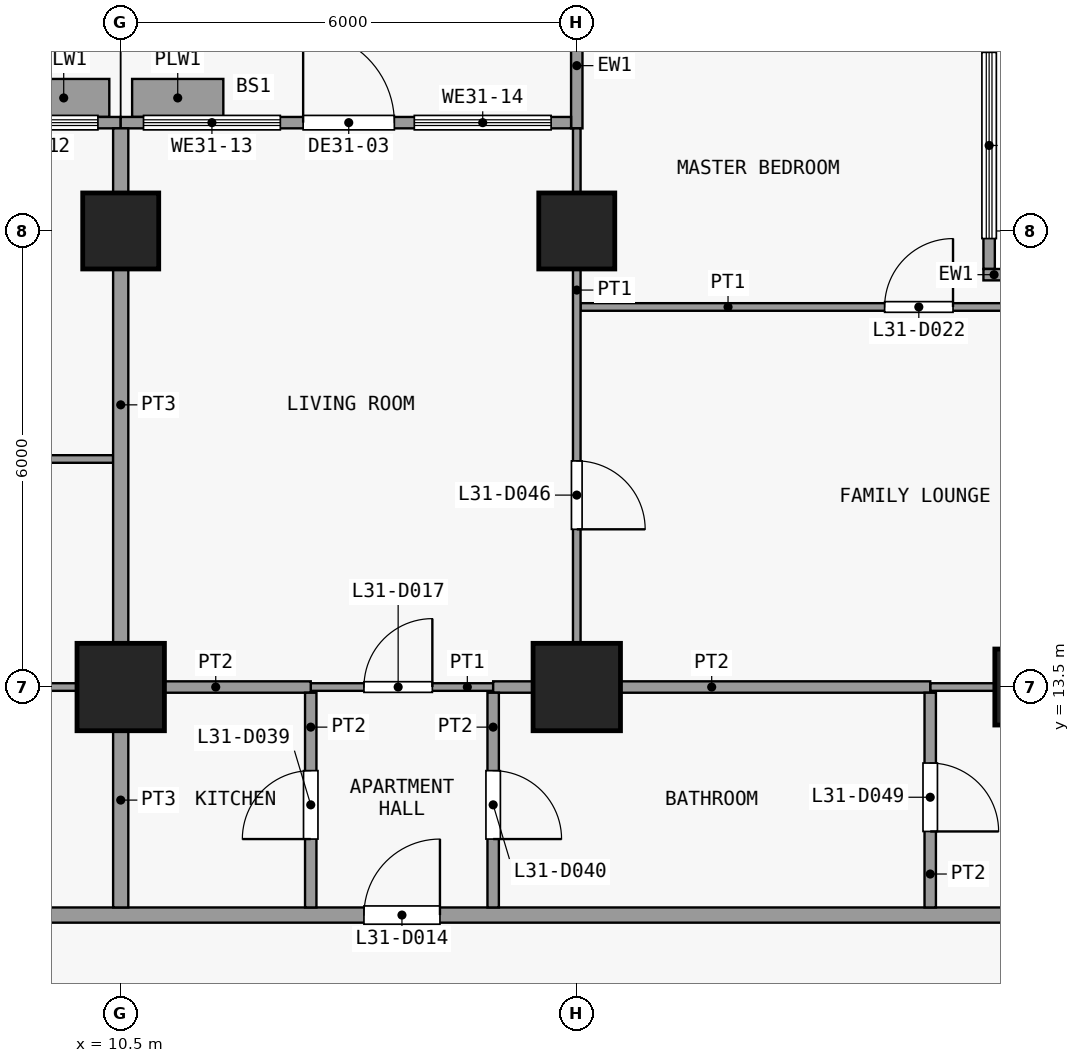
"""IFC4 building model, lengths in metres.
Left out: names, types, materials, properties, quantities, classifications, styles, units other than length and angle.
Written with IfcOpenShell. Run it as: python <this file> out.ifc"""

import sys

from ifc_helpers import new_model, si_unit, direction, frame, frame_2d, origin, origin_2d, place, context, subcontext, project, spatial, rectangle, extrude, element, fill, save


model = new_model("IFC4")
c1 = context("Model", 3, precision=1e-05, world=origin(), true_north=direction((0.0, 1.0)))
c2 = subcontext(c1, "Body", "Model", "MODEL_VIEW")
j1 = project(units=[si_unit("LENGTHUNIT", "METRE"), si_unit("PLANEANGLEUNIT", "RADIAN")], contexts=[c1])
p1 = place(None, origin())
s1 = spatial("IfcSite", under=j1, at=p1, CompositionType="ELEMENT")
p2 = place(p1, origin())
s2 = spatial("IfcBuilding", under=s1, at=p2, CompositionType="ELEMENT")
p3 = place(p2, frame((0.0, 0.0, 124.3)))
s3 = spatial("IfcBuildingStorey", under=s2, at=p3, CompositionType="ELEMENT", Elevation=124.3)
p4 = place(p3, frame((10.5, 13.5, 0.0), z_axis=(0.0, 0.0, 1.0), x_axis=(1.0, 0.0, 0.0)))
e1 = element("IfcColumn", 1, at=p4, inside=s3, PredefinedType="COLUMN", context=c2, shape_type="SweptSolid", body=[
    extrude(rectangle(XDim=1.15, YDim=1.15, at=origin_2d()), origin(), (0.0, 0.0, 1.0), 3.6),
])
p5 = place(p3, frame((10.5, 19.5, 0.0), z_axis=(0.0, 0.0, 1.0), x_axis=(1.0, 0.0, 0.0)))
e2 = element("IfcColumn", 2, at=p5, inside=s3, PredefinedType="COLUMN", context=c2, shape_type="SweptSolid", body=[
    extrude(rectangle(XDim=1.0, YDim=1.0, at=origin_2d()), origin(), (0.0, 0.0, 1.0), 3.6),
])
p6 = place(p3, frame((16.5, 13.5, 0.0), z_axis=(0.0, 0.0, 1.0), x_axis=(1.0, 0.0, 0.0)))
e3 = element("IfcColumn", 3, at=p6, inside=s3, PredefinedType="COLUMN", context=c2, shape_type="SweptSolid", body=[
    extrude(rectangle(XDim=1.15, YDim=1.15, at=origin_2d()), origin(), (0.0, 0.0, 1.0), 3.6),
])
for number, where, z_axis, x_axis in (
    (4, (16.5, 19.5, 0.0), (0.0, 0.0, 1.0), (1.0, 0.0, 0.0)),
    (5, (22.5, 13.5, 0.0), (0.0, 0.0, 1.0), (1.0, 0.0, 0.0)),
):
    element("IfcColumn", number, at=place(p3, frame(where, z_axis=z_axis, x_axis=x_axis)), inside=s3, PredefinedType="COLUMN", context=c2, shape_type="SweptSolid", body=[
        extrude(rectangle(XDim=1.0, YDim=1.0, at=origin_2d()), origin(), (0.0, 0.0, 1.0), 3.6),
    ])
p7 = place(p3, frame((21.925, 22.25, 0.0), z_axis=(0.0, 0.0, 1.0), x_axis=(0.0, -1.0, 0.0)))
e6 = element("IfcWall", 6, at=p7, inside=s3, PredefinedType="SOLIDWALL", context=c2, shape_type="SweptSolid", body=[
    extrude(rectangle(XDim=3.25, YDim=0.15, at=frame_2d((1.625, 0.0))), origin(), (0.0, 0.0, 1.0), 3.3),
])
p8 = place(p7, frame((0.4, 0.0, 0.9)))
e7 = element("IfcOpeningElement", 7, at=p8, cuts=e6, PredefinedType="OPENING", context=c2, shape_type="SweptSolid", body=[
    extrude(rectangle(XDim=2.45, YDim=2.4, at=frame_2d((1.225, 1.2))), frame((0.0, 0.085, 0.0), z_axis=(0.0, -1.0, 0.0), x_axis=(1.0, 0.0, 0.0)), (0.0, 0.0, 1.0), 0.17),
])
p9 = place(p3, frame((21.85, 18.925, 0.0), z_axis=(0.0, 0.0, 1.0), x_axis=(1.0, 0.0, 0.0)))
e8 = element("IfcWall", 8, at=p9, inside=s3, PredefinedType="SOLIDWALL", context=c2, shape_type="SweptSolid", body=[
    extrude(rectangle(XDim=3.65, YDim=0.15, at=frame_2d((1.825, 0.0))), origin(), (0.0, 0.0, 1.0), 3.3),
])
p10 = place(p9, frame((0.4, 0.0, 0.9)))
e9 = element("IfcOpeningElement", 9, at=p10, cuts=e8, PredefinedType="OPENING", context=c2, shape_type="SweptSolid", body=[
    extrude(rectangle(XDim=2.85, YDim=2.4, at=frame_2d((1.425, 1.2))), frame((0.0, 0.085, 0.0), z_axis=(0.0, -1.0, 0.0), x_axis=(1.0, 0.0, 0.0)), (0.0, 0.0, 1.0), 0.17),
])
p11 = place(p3, frame((4.5, 20.925, 0.0), z_axis=(0.0, 0.0, 1.0), x_axis=(1.0, 0.0, 0.0)))
e10 = element("IfcWall", 10, at=p11, inside=s3, PredefinedType="SOLIDWALL", context=c2, shape_type="SweptSolid", body=[
    extrude(rectangle(XDim=6.0, YDim=0.15, at=frame_2d((3.0, 0.0))), origin(), (0.0, 0.0, 1.0), 3.3),
])
p12 = place(p11, frame((2.4, 0.0, 0.0)))
e11 = element("IfcOpeningElement", 11, at=p12, cuts=e10, PredefinedType="OPENING", context=c2, shape_type="SweptSolid", body=[
    extrude(rectangle(XDim=1.2, YDim=2.4, at=frame_2d((0.6, 1.2))), frame((0.0, 0.085, 0.0), z_axis=(0.0, -1.0, 0.0), x_axis=(1.0, 0.0, 0.0)), (0.0, 0.0, 1.0), 0.17),
])
p13 = place(p11, frame((0.3, 0.0, 0.9)))
e12 = element("IfcOpeningElement", 12, at=p13, cuts=e10, PredefinedType="OPENING", context=c2, shape_type="SweptSolid", body=[
    extrude(rectangle(XDim=1.8, YDim=2.1, at=frame_2d((0.9, 1.05))), frame((0.0, 0.085, 0.0), z_axis=(0.0, -1.0, 0.0), x_axis=(1.0, 0.0, 0.0)), (0.0, 0.0, 1.0), 0.17),
])
p14 = place(p11, frame((3.9, 0.0, 0.9)))
e13 = element("IfcOpeningElement", 13, at=p14, cuts=e10, PredefinedType="OPENING", context=c2, shape_type="SweptSolid", body=[
    extrude(rectangle(XDim=1.8, YDim=2.1, at=frame_2d((0.9, 1.05))), frame((0.0, 0.085, 0.0), z_axis=(0.0, -1.0, 0.0), x_axis=(1.0, 0.0, 0.0)), (0.0, 0.0, 1.0), 0.17),
])
p15 = place(p3, frame((9.15, 21.25, 0.0), z_axis=(0.0, 0.0, 1.0), x_axis=(1.0, 0.0, 0.0)))
e14 = element("IfcWall", 14, at=p15, inside=s3, PredefinedType="USERDEFINED", context=c2, shape_type="SweptSolid", body=[
    extrude(rectangle(XDim=1.2, YDim=0.5, at=frame_2d((0.6, 0.0))), origin(), (0.0, 0.0, 1.0), 0.9),
])
p16 = place(p3, frame((16.5, 20.85, 0.0), z_axis=(0.0, 0.0, 1.0), x_axis=(0.0, 1.0, 0.0)))
e15 = element("IfcWall", 15, at=p16, inside=s3, PredefinedType="SOLIDWALL", context=c2, shape_type="SweptSolid", body=[
    extrude(rectangle(XDim=1.65, YDim=0.15, at=frame_2d((0.825, 0.0))), origin(), (0.0, 0.0, 1.0), 3.3),
])
p17 = place(p3, frame((10.5, 20.925, 0.0), z_axis=(0.0, 0.0, 1.0), x_axis=(1.0, 0.0, 0.0)))
e16 = element("IfcWall", 16, at=p17, inside=s3, PredefinedType="SOLIDWALL", context=c2, shape_type="SweptSolid", body=[
    extrude(rectangle(XDim=5.925, YDim=0.15, at=frame_2d((2.962, 0.0))), origin(), (0.0, 0.0, 1.0), 3.3),
])
p18 = place(p17, frame((2.4, 0.0, 0.0)))
e17 = element("IfcOpeningElement", 17, at=p18, cuts=e16, PredefinedType="OPENING", context=c2, shape_type="SweptSolid", body=[
    extrude(rectangle(XDim=1.2, YDim=2.4, at=frame_2d((0.6, 1.2))), frame((0.0, 0.085, 0.0), z_axis=(0.0, -1.0, 0.0), x_axis=(1.0, 0.0, 0.0)), (0.0, 0.0, 1.0), 0.17),
])
p19 = place(p17, frame((0.3, 0.0, 0.9)))
e18 = element("IfcOpeningElement", 18, at=p19, cuts=e16, PredefinedType="OPENING", context=c2, shape_type="SweptSolid", body=[
    extrude(rectangle(XDim=1.8, YDim=2.1, at=frame_2d((0.9, 1.05))), frame((0.0, 0.085, 0.0), z_axis=(0.0, -1.0, 0.0), x_axis=(1.0, 0.0, 0.0)), (0.0, 0.0, 1.0), 0.17),
])
p20 = place(p17, frame((3.863, 0.0, 0.9)))
e19 = element("IfcOpeningElement", 19, at=p20, cuts=e16, PredefinedType="OPENING", context=c2, shape_type="SweptSolid", body=[
    extrude(rectangle(XDim=1.8, YDim=2.1, at=frame_2d((0.9, 1.05))), frame((0.0, 0.085, 0.0), z_axis=(0.0, -1.0, 0.0), x_axis=(1.0, 0.0, 0.0)), (0.0, 0.0, 1.0), 0.17),
])
p21 = place(p3, frame((10.65, 21.25, 0.0), z_axis=(0.0, 0.0, 1.0), x_axis=(1.0, 0.0, 0.0)))
e20 = element("IfcWall", 20, at=p21, inside=s3, PredefinedType="USERDEFINED", context=c2, shape_type="SweptSolid", body=[
    extrude(rectangle(XDim=1.2, YDim=0.5, at=frame_2d((0.6, 0.0))), origin(), (0.0, 0.0, 1.0), 0.9),
])
p22 = place(p3, frame((-25.35, 10.5, 0.0), z_axis=(0.0, 0.0, 1.0), x_axis=(1.0, 0.0, 0.0)))
e21 = element("IfcWall", 21, at=p22, inside=s3, PredefinedType="PARTITIONING", context=c2, shape_type="SweptSolid", body=[
    extrude(rectangle(XDim=49.2, YDim=0.2, at=frame_2d((24.6, 0.0))), origin(), (0.0, 0.0, 1.0), 3.3),
])
p23 = place(p22, frame((4.55, 0.0, 0.0)))
e22 = element("IfcOpeningElement", 22, at=p23, cuts=e21, PredefinedType="OPENING", context=c2, shape_type="SweptSolid", body=[
    extrude(rectangle(XDim=1.0, YDim=2.1, at=frame_2d((0.5, 1.05))), frame((0.0, 0.11, 0.0), z_axis=(0.0, -1.0, 0.0), x_axis=(1.0, 0.0, 0.0)), (0.0, 0.0, 1.0), 0.22),
])
p24 = place(p22, frame((19.05, 0.0, 0.0)))
e23 = element("IfcOpeningElement", 23, at=p24, cuts=e21, PredefinedType="OPENING", context=c2, shape_type="SweptSolid", body=[
    extrude(rectangle(XDim=1.0, YDim=2.1, at=frame_2d((0.5, 1.05))), frame((0.0, 0.11, 0.0), z_axis=(0.0, -1.0, 0.0), x_axis=(1.0, 0.0, 0.0)), (0.0, 0.0, 1.0), 0.22),
])
p25 = place(p22, frame((39.05, 0.0, 0.0)))
e24 = element("IfcOpeningElement", 24, at=p25, cuts=e21, PredefinedType="OPENING", context=c2, shape_type="SweptSolid", body=[
    extrude(rectangle(XDim=1.0, YDim=2.1, at=frame_2d((0.5, 1.05))), frame((0.0, 0.11, 0.0), z_axis=(0.0, -1.0, 0.0), x_axis=(1.0, 0.0, 0.0)), (0.0, 0.0, 1.0), 0.22),
])
p26 = place(p3, frame((2.9, 13.5, 0.0), z_axis=(0.0, 0.0, 1.0), x_axis=(1.0, 0.0, 0.0)))
e25 = element("IfcWall", 25, at=p26, inside=s3, PredefinedType="PARTITIONING", context=c2, shape_type="SweptSolid", body=[
    extrude(rectangle(XDim=7.6, YDim=0.1, at=frame_2d((3.8, 0.0))), origin(), (0.0, 0.0, 1.0), 3.3),
])
p27 = place(p3, frame((13.0, 13.5, 0.0), z_axis=(0.0, 0.0, 1.0), x_axis=(1.0, 0.0, 0.0)))
e26 = element("IfcWall", 26, at=p27, inside=s3, PredefinedType="PARTITIONING", context=c2, shape_type="SweptSolid", body=[
    extrude(rectangle(XDim=2.4, YDim=0.1, at=frame_2d((1.2, 0.0))), origin(), (0.0, 0.0, 1.0), 3.3),
])
p28 = place(p27, frame((0.7, 0.0, 0.0)))
e27 = element("IfcOpeningElement", 27, at=p28, cuts=e26, PredefinedType="OPENING", context=c2, shape_type="SweptSolid", body=[
    extrude(rectangle(XDim=0.9, YDim=2.1, at=frame_2d((0.45, 1.05))), frame((0.0, 0.06, 0.0), z_axis=(0.0, -1.0, 0.0), x_axis=(1.0, 0.0, 0.0)), (0.0, 0.0, 1.0), 0.12),
])
p29 = place(p3, frame((21.15, 13.5, 0.0), z_axis=(0.0, 0.0, 1.0), x_axis=(1.0, 0.0, 0.0)))
e28 = element("IfcWall", 28, at=p29, inside=s3, PredefinedType="PARTITIONING", context=c2, shape_type="SweptSolid", body=[
    extrude(rectangle(XDim=2.7, YDim=0.1, at=frame_2d((1.35, 0.0))), origin(), (0.0, 0.0, 1.0), 3.3),
])
p30 = place(p3, frame((10.5, 13.5, 0.0), z_axis=(0.0, 0.0, 1.0), x_axis=(1.0, 0.0, 0.0)))
e29 = element("IfcWall", 29, at=p30, inside=s3, PredefinedType="PARTITIONING", context=c2, shape_type="SweptSolid", body=[
    extrude(rectangle(XDim=2.5, YDim=0.15, at=frame_2d((1.25, 0.0))), origin(), (0.0, 0.0, 1.0), 3.3),
])
p31 = place(p3, frame((15.4, 13.5, 0.0), z_axis=(0.0, 0.0, 1.0), x_axis=(1.0, 0.0, 0.0)))
e30 = element("IfcWall", 30, at=p31, inside=s3, PredefinedType="PARTITIONING", context=c2, shape_type="SweptSolid", body=[
    extrude(rectangle(XDim=5.75, YDim=0.15, at=frame_2d((2.875, 0.0))), origin(), (0.0, 0.0, 1.0), 3.3),
])
p32 = place(p3, frame((4.55, 16.5, 0.0), z_axis=(0.0, 0.0, 1.0), x_axis=(1.0, 0.0, 0.0)))
e31 = element("IfcWall", 31, at=p32, inside=s3, PredefinedType="PARTITIONING", context=c2, shape_type="SweptSolid", body=[
    extrude(rectangle(XDim=5.85, YDim=0.1, at=frame_2d((2.925, 0.0))), origin(), (0.0, 0.0, 1.0), 3.3),
])
p33 = place(p32, frame((2.5, 0.0, 0.0)))
e32 = element("IfcOpeningElement", 32, at=p33, cuts=e31, PredefinedType="OPENING", context=c2, shape_type="SweptSolid", body=[
    extrude(rectangle(XDim=0.9, YDim=2.1, at=frame_2d((0.45, 1.05))), frame((0.0, 0.06, 0.0), z_axis=(0.0, -1.0, 0.0), x_axis=(1.0, 0.0, 0.0)), (0.0, 0.0, 1.0), 0.12),
])
p34 = place(p3, frame((16.55, 18.5, 0.0), z_axis=(0.0, 0.0, 1.0), x_axis=(1.0, 0.0, 0.0)))
e33 = element("IfcWall", 33, at=p34, inside=s3, PredefinedType="PARTITIONING", context=c2, shape_type="SweptSolid", body=[
    extrude(rectangle(XDim=8.7, YDim=0.1, at=frame_2d((4.35, 0.0))), origin(), (0.0, 0.0, 1.0), 3.3),
])
p35 = place(p34, frame((4.0, 0.0, 0.0)))
e34 = element("IfcOpeningElement", 34, at=p35, cuts=e33, PredefinedType="OPENING", context=c2, shape_type="SweptSolid", body=[
    extrude(rectangle(XDim=0.9, YDim=2.1, at=frame_2d((0.45, 1.05))), frame((0.0, 0.06, 0.0), z_axis=(0.0, -1.0, 0.0), x_axis=(1.0, 0.0, 0.0)), (0.0, 0.0, 1.0), 0.12),
])
p36 = place(p3, frame((10.5, 10.6, 0.0), z_axis=(0.0, 0.0, 1.0), x_axis=(0.0, 1.0, 0.0)))
e35 = element("IfcWall", 35, at=p36, inside=s3, PredefinedType="PARTITIONING", context=c2, shape_type="SweptSolid", body=[
    extrude(rectangle(XDim=2.825, YDim=0.2, at=frame_2d((1.413, 0.0))), origin(), (0.0, 0.0, 1.0), 3.3),
])
p37 = place(p3, frame((10.5, 13.575, 0.0), z_axis=(0.0, 0.0, 1.0), x_axis=(0.0, 1.0, 0.0)))
e36 = element("IfcWall", 36, at=p37, inside=s3, PredefinedType="PARTITIONING", context=c2, shape_type="SweptSolid", body=[
    extrude(rectangle(XDim=7.275, YDim=0.2, at=frame_2d((3.638, 0.0))), origin(), (0.0, 0.0, 1.0), 3.3),
])
p38 = place(p3, frame((13.0, 10.6, 0.0), z_axis=(0.0, 0.0, 1.0), x_axis=(0.0, 1.0, 0.0)))
e37 = element("IfcWall", 37, at=p38, inside=s3, PredefinedType="PARTITIONING", context=c2, shape_type="SweptSolid", body=[
    extrude(rectangle(XDim=2.825, YDim=0.15, at=frame_2d((1.413, 0.0))), origin(), (0.0, 0.0, 1.0), 3.3),
])
p39 = place(p38, frame((0.9, 0.0, 0.0)))
e38 = element("IfcOpeningElement", 38, at=p39, cuts=e37, PredefinedType="OPENING", context=c2, shape_type="SweptSolid", body=[
    extrude(rectangle(XDim=0.9, YDim=2.1, at=frame_2d((0.45, 1.05))), frame((0.0, 0.085, 0.0), z_axis=(0.0, -1.0, 0.0), x_axis=(1.0, 0.0, 0.0)), (0.0, 0.0, 1.0), 0.17),
])
p40 = place(p3, frame((15.4, 10.6, 0.0), z_axis=(0.0, 0.0, 1.0), x_axis=(0.0, 1.0, 0.0)))
e39 = element("IfcWall", 39, at=p40, inside=s3, PredefinedType="PARTITIONING", context=c2, shape_type="SweptSolid", body=[
    extrude(rectangle(XDim=2.825, YDim=0.15, at=frame_2d((1.413, 0.0))), origin(), (0.0, 0.0, 1.0), 3.3),
])
p41 = place(p40, frame((0.9, 0.0, 0.0)))
e40 = element("IfcOpeningElement", 40, at=p41, cuts=e39, PredefinedType="OPENING", context=c2, shape_type="SweptSolid", body=[
    extrude(rectangle(XDim=0.9, YDim=2.1, at=frame_2d((0.45, 1.05))), frame((0.0, 0.085, 0.0), z_axis=(0.0, -1.0, 0.0), x_axis=(1.0, 0.0, 0.0)), (0.0, 0.0, 1.0), 0.17),
])
p42 = place(p3, frame((16.5, 13.575, 0.0), z_axis=(0.0, 0.0, 1.0), x_axis=(0.0, 1.0, 0.0)))
e41 = element("IfcWall", 41, at=p42, inside=s3, PredefinedType="PARTITIONING", context=c2, shape_type="SweptSolid", body=[
    extrude(rectangle(XDim=7.275, YDim=0.1, at=frame_2d((3.638, 0.0))), origin(), (0.0, 0.0, 1.0), 3.3),
])
p43 = place(p42, frame((2.0, 0.0, 0.0)))
e42 = element("IfcOpeningElement", 42, at=p43, cuts=e41, PredefinedType="OPENING", context=c2, shape_type="SweptSolid", body=[
    extrude(rectangle(XDim=0.9, YDim=2.1, at=frame_2d((0.45, 1.05))), frame((0.0, 0.06, 0.0), z_axis=(0.0, -1.0, 0.0), x_axis=(1.0, 0.0, 0.0)), (0.0, 0.0, 1.0), 0.12),
])
p44 = place(p3, frame((21.15, 10.6, 0.0), z_axis=(0.0, 0.0, 1.0), x_axis=(0.0, 1.0, 0.0)))
e43 = element("IfcWall", 43, at=p44, inside=s3, PredefinedType="PARTITIONING", context=c2, shape_type="SweptSolid", body=[
    extrude(rectangle(XDim=2.825, YDim=0.15, at=frame_2d((1.413, 0.0))), origin(), (0.0, 0.0, 1.0), 3.3),
])
p45 = place(p44, frame((1.0, 0.0, 0.0)))
e44 = element("IfcOpeningElement", 44, at=p45, cuts=e43, PredefinedType="OPENING", context=c2, shape_type="SweptSolid", body=[
    extrude(rectangle(XDim=0.9, YDim=2.1, at=frame_2d((0.45, 1.05))), frame((0.0, 0.085, 0.0), z_axis=(0.0, -1.0, 0.0), x_axis=(1.0, 0.0, 0.0)), (0.0, 0.0, 1.0), 0.17),
])
p46 = place(p8, origin())
e45 = element("IfcWindow", 45, at=p46, inside=s3, PartitioningType="SINGLE_PANEL", PredefinedType="WINDOW", context=c2, shape_type="SweptSolid", body=[
    extrude(rectangle(XDim=2.45, YDim=2.4, at=frame_2d((1.225, 1.2))), frame((0.0, 0.03, 0.0), z_axis=(0.0, -1.0, 0.0), x_axis=(1.0, 0.0, 0.0)), (0.0, 0.0, 1.0), 0.06),
])
fill(e7, e45)
p47 = place(p14, origin())
e46 = element("IfcWindow", 46, at=p47, inside=s3, PartitioningType="SINGLE_PANEL", PredefinedType="WINDOW", context=c2, shape_type="SweptSolid", body=[
    extrude(rectangle(XDim=1.8, YDim=2.1, at=frame_2d((0.9, 1.05))), frame((0.0, 0.03, 0.0), z_axis=(0.0, -1.0, 0.0), x_axis=(1.0, 0.0, 0.0)), (0.0, 0.0, 1.0), 0.06),
])
fill(e13, e46)
p48 = place(p18, origin())
e47 = element("IfcDoor", 47, at=p48, inside=s3, OperationType="SINGLE_SWING_LEFT", PredefinedType="DOOR", context=c2, shape_type="SweptSolid", body=[
    extrude(rectangle(XDim=1.2, YDim=2.4, at=frame_2d((0.6, 1.2))), frame((0.0, 0.025, 0.0), z_axis=(0.0, -1.0, 0.0), x_axis=(1.0, 0.0, 0.0)), (0.0, 0.0, 1.0), 0.05),
])
fill(e17, e47)
p49 = place(p19, origin())
e48 = element("IfcWindow", 48, at=p49, inside=s3, PartitioningType="SINGLE_PANEL", PredefinedType="WINDOW", context=c2, shape_type="SweptSolid", body=[
    extrude(rectangle(XDim=1.8, YDim=2.1, at=frame_2d((0.9, 1.05))), frame((0.0, 0.03, 0.0), z_axis=(0.0, -1.0, 0.0), x_axis=(1.0, 0.0, 0.0)), (0.0, 0.0, 1.0), 0.06),
])
fill(e18, e48)
p50 = place(p20, origin())
e49 = element("IfcWindow", 49, at=p50, inside=s3, PartitioningType="SINGLE_PANEL", PredefinedType="WINDOW", context=c2, shape_type="SweptSolid", body=[
    extrude(rectangle(XDim=1.8, YDim=2.1, at=frame_2d((0.9, 1.05))), frame((0.0, 0.03, 0.0), z_axis=(0.0, -1.0, 0.0), x_axis=(1.0, 0.0, 0.0)), (0.0, 0.0, 1.0), 0.06),
])
fill(e19, e49)
p51 = place(p25, origin())
e50 = element("IfcDoor", 50, at=p51, inside=s3, OperationType="SINGLE_SWING_LEFT", PredefinedType="DOOR", context=c2, shape_type="SweptSolid", body=[
    extrude(rectangle(XDim=1.0, YDim=2.1, at=frame_2d((0.5, 1.05))), frame((0.0, 0.025, 0.0), z_axis=(0.0, -1.0, 0.0), x_axis=(1.0, 0.0, 0.0)), (0.0, 0.0, 1.0), 0.05),
])
fill(e24, e50)
p52 = place(p28, origin())
e51 = element("IfcDoor", 51, at=p52, inside=s3, OperationType="SINGLE_SWING_LEFT", PredefinedType="DOOR", context=c2, shape_type="SweptSolid", body=[
    extrude(rectangle(XDim=0.9, YDim=2.1, at=frame_2d((0.45, 1.05))), frame((0.0, 0.025, 0.0), z_axis=(0.0, -1.0, 0.0), x_axis=(1.0, 0.0, 0.0)), (0.0, 0.0, 1.0), 0.05),
])
fill(e27, e51)
p53 = place(p35, origin())
e52 = element("IfcDoor", 52, at=p53, inside=s3, OperationType="SINGLE_SWING_LEFT", PredefinedType="DOOR", context=c2, shape_type="SweptSolid", body=[
    extrude(rectangle(XDim=0.9, YDim=2.1, at=frame_2d((0.45, 1.05))), frame((0.0, 0.025, 0.0), z_axis=(0.0, -1.0, 0.0), x_axis=(1.0, 0.0, 0.0)), (0.0, 0.0, 1.0), 0.05),
])
fill(e34, e52)
p54 = place(p39, origin())
e53 = element("IfcDoor", 53, at=p54, inside=s3, OperationType="SINGLE_SWING_RIGHT", PredefinedType="DOOR", context=c2, shape_type="SweptSolid", body=[
    extrude(rectangle(XDim=0.9, YDim=2.1, at=frame_2d((0.45, 1.05))), frame((0.0, 0.025, 0.0), z_axis=(0.0, -1.0, 0.0), x_axis=(1.0, 0.0, 0.0)), (0.0, 0.0, 1.0), 0.05),
])
fill(e38, e53)
p55 = place(p41, origin())
e54 = element("IfcDoor", 54, at=p55, inside=s3, OperationType="SINGLE_SWING_LEFT", PredefinedType="DOOR", context=c2, shape_type="SweptSolid", body=[
    extrude(rectangle(XDim=0.9, YDim=2.1, at=frame_2d((0.45, 1.05))), frame((0.0, 0.025, 0.0), z_axis=(0.0, -1.0, 0.0), x_axis=(1.0, 0.0, 0.0)), (0.0, 0.0, 1.0), 0.05),
])
fill(e40, e54)
p56 = place(p43, origin())
e55 = element("IfcDoor", 55, at=p56, inside=s3, OperationType="SINGLE_SWING_LEFT", PredefinedType="DOOR", context=c2, shape_type="SweptSolid", body=[
    extrude(rectangle(XDim=0.9, YDim=2.1, at=frame_2d((0.45, 1.05))), frame((0.0, 0.025, 0.0), z_axis=(0.0, -1.0, 0.0), x_axis=(1.0, 0.0, 0.0)), (0.0, 0.0, 1.0), 0.05),
])
fill(e42, e55)
p57 = place(p45, origin())
e56 = element("IfcDoor", 56, at=p57, inside=s3, OperationType="SINGLE_SWING_LEFT", PredefinedType="DOOR", context=c2, shape_type="SweptSolid", body=[
    extrude(rectangle(XDim=0.9, YDim=2.1, at=frame_2d((0.45, 1.05))), frame((0.0, 0.025, 0.0), z_axis=(0.0, -1.0, 0.0), x_axis=(1.0, 0.0, 0.0)), (0.0, 0.0, 1.0), 0.05),
])
fill(e44, e56)
save(model, sys.argv[1])
